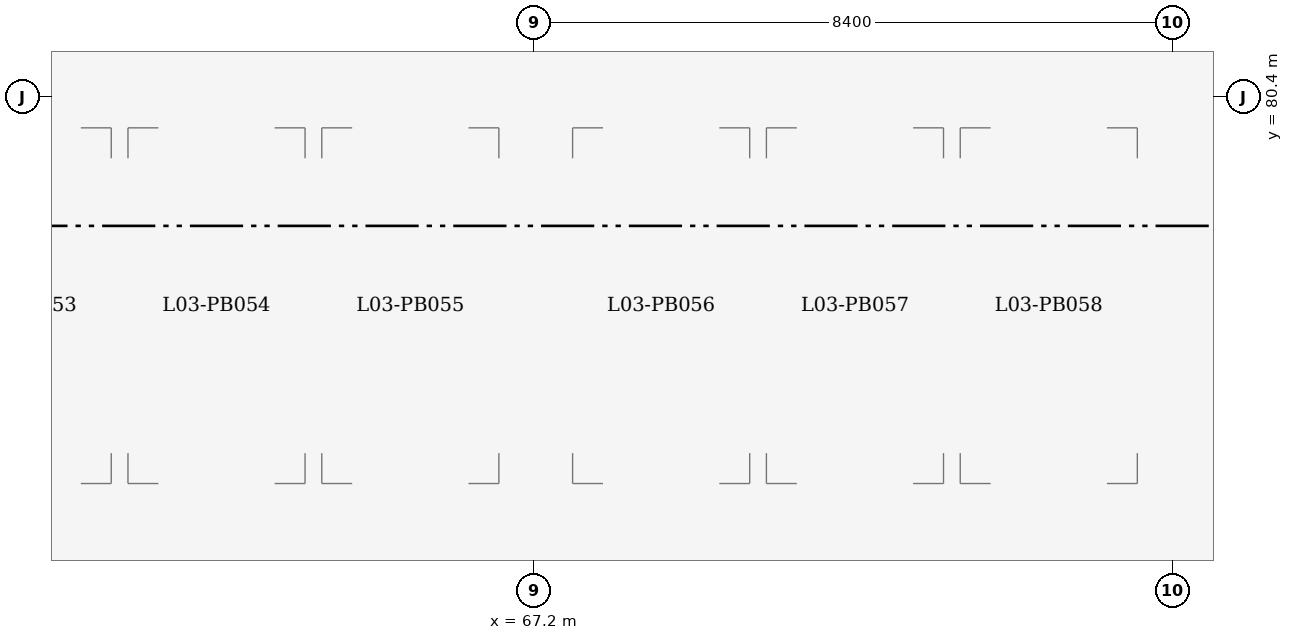
"""IFC4 building model, lengths in metres.
Left out: names, types, materials, properties, quantities, classifications, styles, units other than length and angle.
Written with IfcOpenShell. Run it as: python <this file> out.ifc"""

import sys

from ifc_helpers import new_model, si_unit, direction, frame, origin, origin_2d, place, context, subcontext, project, spatial, i_section, extrude, element, save


model = new_model("IFC4")
c1 = context("Model", 3, precision=1e-05, world=origin(), true_north=direction((0.0, 1.0)))
c2 = subcontext(c1, "Body", "Model", "MODEL_VIEW")
j1 = project(units=[si_unit("LENGTHUNIT", "METRE"), si_unit("PLANEANGLEUNIT", "RADIAN")], contexts=[c1])
p1 = place(None, origin())
s1 = spatial("IfcSite", under=j1, at=p1, CompositionType="ELEMENT")
p2 = place(p1, origin())
s2 = spatial("IfcBuilding", under=s1, at=p2, CompositionType="ELEMENT")
p3 = place(p2, frame((0.0, 0.0, 12.6)))
s3 = spatial("IfcBuildingStorey", under=s2, at=p3, CompositionType="ELEMENT", Elevation=12.6)
for number, where, z_axis, x_axis in (
    (1, (67.2, 80.4, 0.0), (0.0, 0.0, 1.0), (1.0, 0.0, 0.0)),
    (2, (75.6, 80.4, 0.0), (0.0, 0.0, 1.0), (1.0, 0.0, 0.0)),
):
    element("IfcColumn", number, at=place(p3, frame(where, z_axis=z_axis, x_axis=x_axis)), inside=s3, PredefinedType="COLUMN", context=c2, shape_type="SweptSolid", body=[
        extrude(i_section(OverallWidth=0.373, OverallDepth=0.368, WebThickness=0.014, FlangeThickness=0.024, FilletRadius=0.015, at=origin_2d()), origin(), (0.0, 0.0, 1.0), 3.6),
    ])
save(model, sys.argv[1])
